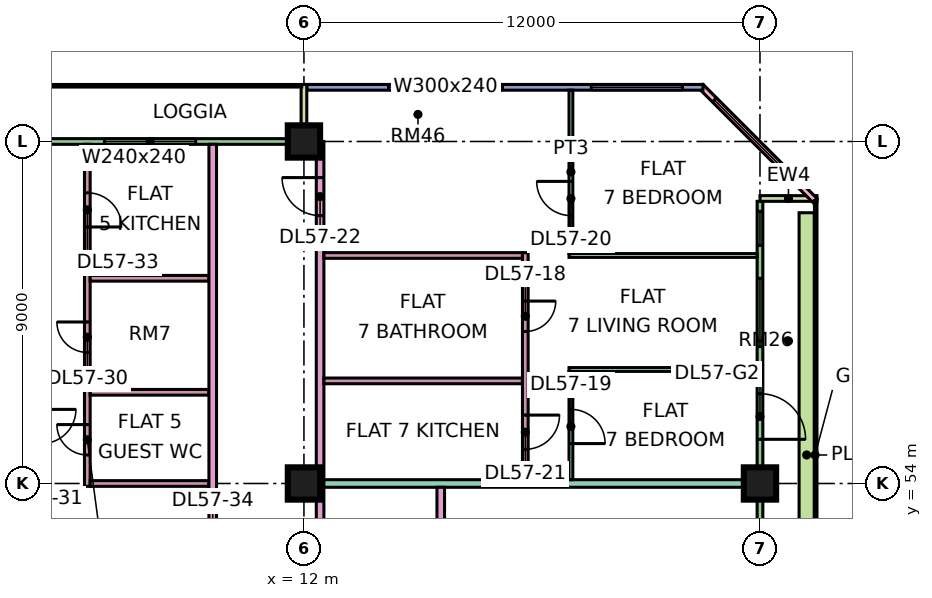
"""IFC4 building model, lengths in metres.
Left out: names, types, materials, properties, quantities, classifications, styles, units other than length and angle.
Written with IfcOpenShell. Run it as: python <this file> out.ifc"""

import sys

from ifc_helpers import new_model, si_unit, direction, frame, frame_2d, origin, origin_2d, place, context, subcontext, project, spatial, rectangle, extrude, element, fill, save


model = new_model("IFC4")
c1 = context("Model", 3, precision=1e-05, world=origin(), true_north=direction((0.0, 1.0)))
c2 = subcontext(c1, "Body", "Model", "MODEL_VIEW")
j1 = project(units=[si_unit("LENGTHUNIT", "METRE"), si_unit("PLANEANGLEUNIT", "RADIAN")], contexts=[c1])
p1 = place(None, origin())
s1 = spatial("IfcSite", under=j1, at=p1, CompositionType="ELEMENT")
p2 = place(p1, origin())
s2 = spatial("IfcBuilding", under=s1, at=p2, CompositionType="ELEMENT")
p3 = place(p2, frame((0.0, 0.0, 241.65)))
s3 = spatial("IfcBuildingStorey", under=s2, at=p3, CompositionType="ELEMENT", Elevation=241.65)
for number, where, z_axis, x_axis in (
    (1, (12.0, 54.0, 0.0), (0.0, 0.0, 1.0), (1.0, 0.0, 0.0)),
    (2, (12.0, 63.0, 0.0), (0.0, 0.0, 1.0), (1.0, 0.0, 0.0)),
    (3, (24.0, 54.0, 0.0), (0.0, 0.0, 1.0), (1.0, 0.0, 0.0)),
):
    element("IfcColumn", number, at=place(p3, frame(where, z_axis=z_axis, x_axis=x_axis)), inside=s3, PredefinedType="COLUMN", context=c2, shape_type="SweptSolid", body=[
        extrude(rectangle(XDim=0.85, YDim=0.85, at=origin_2d()), origin(), (0.0, 0.0, 1.0), 3.75),
    ])
p4 = place(p3, frame((24.0, 48.075, 0.0), z_axis=(0.0, 0.0, 1.0), x_axis=(0.0, 1.0, 0.0)))
e4 = element("IfcWall", 4, at=p4, inside=s3, PredefinedType="SOLIDWALL", context=c2, shape_type="SweptSolid", body=[
    extrude(rectangle(XDim=13.35, YDim=0.15, at=frame_2d((6.675, 0.0))), origin(), (0.0, 0.0, 1.0), 3.35),
])
p5 = place(p4, frame((0.6, 0.0, 0.45)))
e5 = element("IfcOpeningElement", 5, at=p5, cuts=e4, PredefinedType="OPENING", context=c2, shape_type="SweptSolid", body=[
    extrude(rectangle(XDim=4.2, YDim=2.4, at=frame_2d((2.1, 1.2))), frame((0.0, 0.085, 0.0), z_axis=(0.0, -1.0, 0.0), x_axis=(1.0, 0.0, 0.0)), (0.0, 0.0, 1.0), 0.17),
])
p6 = place(p4, frame((7.087, 0.0, 0.0)))
e6 = element("IfcOpeningElement", 6, at=p6, cuts=e4, PredefinedType="OPENING", context=c2, shape_type="SweptSolid", body=[
    extrude(rectangle(XDim=1.2, YDim=2.4, at=frame_2d((0.6, 1.2))), frame((0.0, 0.085, 0.0), z_axis=(0.0, -1.0, 0.0), x_axis=(1.0, 0.0, 0.0)), (0.0, 0.0, 1.0), 0.17),
])
p7 = place(p4, frame((9.525, 0.0, 0.45)))
e7 = element("IfcOpeningElement", 7, at=p7, cuts=e4, PredefinedType="OPENING", context=c2, shape_type="SweptSolid", body=[
    extrude(rectangle(XDim=1.8, YDim=2.4, at=frame_2d((0.9, 1.2))), frame((0.0, 0.085, 0.0), z_axis=(0.0, -1.0, 0.0), x_axis=(1.0, 0.0, 0.0)), (0.0, 0.0, 1.0), 0.17),
])
p8 = place(p4, frame((12.188, 0.0, 0.45)))
e8 = element("IfcOpeningElement", 8, at=p8, cuts=e4, PredefinedType="OPENING", context=c2, shape_type="SweptSolid", body=[
    extrude(rectangle(XDim=0.9, YDim=2.4, at=frame_2d((0.45, 1.2))), frame((0.0, 0.085, 0.0), z_axis=(0.0, -1.0, 0.0), x_axis=(1.0, 0.0, 0.0)), (0.0, 0.0, 1.0), 0.17),
])
p9 = place(p3, frame((25.5, 61.5, 0.0), z_axis=(0.0, 0.0, 1.0), x_axis=(-1.0, 0.0, 0.0)))
e9 = element("IfcWall", 9, at=p9, inside=s3, PredefinedType="SOLIDWALL", context=c2, shape_type="SweptSolid", body=[
    extrude(rectangle(XDim=1.5, YDim=0.15, at=frame_2d((0.75, 0.0))), origin(), (0.0, 0.0, 1.0), 3.35),
])
p10 = place(p3, frame((25.447, 61.447, 0.0), z_axis=(0.0, 0.0, 1.0), x_axis=(-0.707106781187, 0.707106781187, 0.0)))
e10 = element("IfcWall", 10, at=p10, inside=s3, PredefinedType="SOLIDWALL", context=c2, shape_type="SweptSolid", body=[
    extrude(rectangle(XDim=4.243, YDim=0.15, at=frame_2d((2.121, 0.0))), origin(), (0.0, 0.0, 1.0), 3.35),
])
p11 = place(p10, frame((0.744, 0.0, 0.45)))
e11 = element("IfcOpeningElement", 11, at=p11, cuts=e10, PredefinedType="OPENING", context=c2, shape_type="SweptSolid", body=[
    extrude(rectangle(XDim=3.0, YDim=2.4, at=frame_2d((1.5, 1.2))), frame((0.0, 0.085, 0.0), z_axis=(0.0, -1.0, 0.0), x_axis=(1.0, 0.0, 0.0)), (0.0, 0.0, 1.0), 0.17),
])
p12 = place(p3, frame((22.5, 64.425, 0.0), z_axis=(0.0, 0.0, 1.0), x_axis=(-1.0, 0.0, 0.0)))
e12 = element("IfcWall", 12, at=p12, inside=s3, PredefinedType="SOLIDWALL", context=c2, shape_type="SweptSolid", body=[
    extrude(rectangle(XDim=10.425, YDim=0.15, at=frame_2d((5.212, 0.0))), origin(), (0.0, 0.0, 1.0), 3.35),
])
p13 = place(p12, frame((0.538, 0.0, 0.45)))
e13 = element("IfcOpeningElement", 13, at=p13, cuts=e12, PredefinedType="OPENING", context=c2, shape_type="SweptSolid", body=[
    extrude(rectangle(XDim=2.4, YDim=2.4, at=frame_2d((1.2, 1.2))), frame((0.0, 0.085, 0.0), z_axis=(0.0, -1.0, 0.0), x_axis=(1.0, 0.0, 0.0)), (0.0, 0.0, 1.0), 0.17),
])
p14 = place(p12, frame((5.275, 0.0, 0.45)))
e14 = element("IfcOpeningElement", 14, at=p14, cuts=e12, PredefinedType="OPENING", context=c2, shape_type="SweptSolid", body=[
    extrude(rectangle(XDim=3.0, YDim=2.4, at=frame_2d((1.5, 1.2))), frame((0.0, 0.085, 0.0), z_axis=(0.0, -1.0, 0.0), x_axis=(1.0, 0.0, 0.0)), (0.0, 0.0, 1.0), 0.17),
])
p15 = place(p3, frame((11.925, 63.0, 0.0), z_axis=(0.0, 0.0, 1.0), x_axis=(-1.0, 0.0, 0.0)))
e15 = element("IfcWall", 15, at=p15, inside=s3, PredefinedType="SOLIDWALL", context=c2, shape_type="SweptSolid", body=[
    extrude(rectangle(XDim=10.35, YDim=0.15, at=frame_2d((5.175, 0.0))), origin(), (0.0, 0.0, 1.0), 3.35),
])
p16 = place(p15, frame((2.775, 0.0, 0.45)))
e16 = element("IfcOpeningElement", 16, at=p16, cuts=e15, PredefinedType="OPENING", context=c2, shape_type="SweptSolid", body=[
    extrude(rectangle(XDim=2.4, YDim=2.4, at=frame_2d((1.2, 1.2))), frame((0.0, 0.085, 0.0), z_axis=(0.0, -1.0, 0.0), x_axis=(1.0, 0.0, 0.0)), (0.0, 0.0, 1.0), 0.17),
])
p17 = place(p15, frame((7.087, 0.0, 0.0)))
e17 = element("IfcOpeningElement", 17, at=p17, cuts=e15, PredefinedType="OPENING", context=c2, shape_type="SweptSolid", body=[
    extrude(rectangle(XDim=1.8, YDim=2.4, at=frame_2d((0.9, 1.2))), frame((0.0, 0.085, 0.0), z_axis=(0.0, -1.0, 0.0), x_axis=(1.0, 0.0, 0.0)), (0.0, 0.0, 1.0), 0.17),
])
p18 = place(p3, frame((12.0, 64.5, 0.0), z_axis=(0.0, 0.0, 1.0), x_axis=(0.0, -1.0, 0.0)))
e18 = element("IfcWall", 18, at=p18, inside=s3, PredefinedType="SOLIDWALL", context=c2, shape_type="SweptSolid", body=[
    extrude(rectangle(XDim=1.5, YDim=0.15, at=frame_2d((0.75, 0.0))), origin(), (0.0, 0.0, 1.0), 3.35),
])
p19 = place(p3, frame((25.229, 48.375, 0.0), z_axis=(0.0, 0.0, 1.0), x_axis=(0.0, 1.0, 0.0)))
e19 = element("IfcWall", 19, at=p19, inside=s3, PredefinedType="SOLIDWALL", context=c2, shape_type="SweptSolid", body=[
    extrude(rectangle(XDim=12.75, YDim=0.4, at=frame_2d((6.375, 0.0))), origin(), (0.0, 0.0, 1.0), 0.7),
])
p20 = place(p3, frame((6.3, 53.925, 0.0), z_axis=(0.0, 0.0, 1.0), x_axis=(0.0, 1.0, 0.0)))
e20 = element("IfcWall", 20, at=p20, inside=s3, PredefinedType="PARTITIONING", context=c2, shape_type="SweptSolid", body=[
    extrude(rectangle(XDim=9.001, YDim=0.15, at=frame_2d((4.5, 0.0))), origin(), (0.0, 0.0, 1.0), 3.35),
])
p21 = place(p20, frame((3.525, 0.0, 0.0)))
e21 = element("IfcOpeningElement", 21, at=p21, cuts=e20, PredefinedType="OPENING", context=c2, shape_type="SweptSolid", body=[
    extrude(rectangle(XDim=0.8, YDim=2.1, at=frame_2d((0.4, 1.05))), frame((0.0, 0.085, 0.0), z_axis=(0.0, -1.0, 0.0), x_axis=(1.0, 0.0, 0.0)), (0.0, 0.0, 1.0), 0.17),
])
p22 = place(p20, frame((6.825, 0.0, 0.0)))
e22 = element("IfcOpeningElement", 22, at=p22, cuts=e20, PredefinedType="OPENING", context=c2, shape_type="SweptSolid", body=[
    extrude(rectangle(XDim=0.9, YDim=2.1, at=frame_2d((0.45, 1.05))), frame((0.0, 0.085, 0.0), z_axis=(0.0, -1.0, 0.0), x_axis=(1.0, 0.0, 0.0)), (0.0, 0.0, 1.0), 0.17),
])
p23 = place(p20, frame((0.825, 0.0, 0.0)))
e23 = element("IfcOpeningElement", 23, at=p23, cuts=e20, PredefinedType="OPENING", context=c2, shape_type="SweptSolid", body=[
    extrude(rectangle(XDim=0.8, YDim=2.1, at=frame_2d((0.4, 1.05))), frame((0.0, 0.085, 0.0), z_axis=(0.0, -1.0, 0.0), x_axis=(1.0, 0.0, 0.0)), (0.0, 0.0, 1.0), 0.17),
])
for number, where, z_axis, x_axis in (
    (24, (6.375, 54.0, 0.0), (0.0, 0.0, 1.0), (1.0, 0.0, 0.0)),
    (25, (6.375, 56.4, 0.0), (0.0, 0.0, 1.0), (1.0, 0.0, 0.0)),
    (26, (6.375, 59.4, 0.0), (0.0, 0.0, 1.0), (1.0, 0.0, 0.0)),
):
    element("IfcWall", number, at=place(p3, frame(where, z_axis=z_axis, x_axis=x_axis)), inside=s3, PredefinedType="PARTITIONING", context=c2, shape_type="SweptSolid", body=[
        extrude(rectangle(XDim=3.125, YDim=0.15, at=frame_2d((1.562, 0.0))), origin(), (0.0, 0.0, 1.0), 3.35),
    ])
p24 = place(p3, frame((9.6, 20.0, 0.0), z_axis=(0.0, 0.0, 1.0), x_axis=(0.0, 1.0, 0.0)))
e27 = element("IfcWall", 27, at=p24, inside=s3, PredefinedType="PARTITIONING", context=c2, shape_type="SweptSolid", body=[
    extrude(rectangle(XDim=42.926, YDim=0.2, at=frame_2d((21.463, 0.0))), origin(), (0.0, 0.0, 1.0), 3.35),
])
p25 = place(p24, frame((28.95, 0.0, 0.0)))
e28 = element("IfcOpeningElement", 28, at=p25, cuts=e27, PredefinedType="OPENING", context=c2, shape_type="SweptSolid", body=[
    extrude(rectangle(XDim=1.0, YDim=2.1, at=frame_2d((0.5, 1.05))), frame((0.0, 0.11, 0.0), z_axis=(0.0, -1.0, 0.0), x_axis=(1.0, 0.0, 0.0)), (0.0, 0.0, 1.0), 0.22),
])
p26 = place(p24, frame((31.95, 0.0, 0.0)))
e29 = element("IfcOpeningElement", 29, at=p26, cuts=e27, PredefinedType="OPENING", context=c2, shape_type="SweptSolid", body=[
    extrude(rectangle(XDim=1.0, YDim=2.1, at=frame_2d((0.5, 1.05))), frame((0.0, 0.11, 0.0), z_axis=(0.0, -1.0, 0.0), x_axis=(1.0, 0.0, 0.0)), (0.0, 0.0, 1.0), 0.22),
])
p27 = place(p24, frame((0.6, 0.0, 0.0)))
e30 = element("IfcOpeningElement", 30, at=p27, cuts=e27, PredefinedType="OPENING", context=c2, shape_type="SweptSolid", body=[
    extrude(rectangle(XDim=1.2, YDim=2.1, at=frame_2d((0.6, 1.05))), frame((0.0, 0.11, 0.0), z_axis=(0.0, -1.0, 0.0), x_axis=(1.0, 0.0, 0.0)), (0.0, 0.0, 1.0), 0.22),
])
p28 = place(p24, frame((11.25, 0.0, 0.0)))
e31 = element("IfcOpeningElement", 31, at=p28, cuts=e27, PredefinedType="OPENING", context=c2, shape_type="SweptSolid", body=[
    extrude(rectangle(XDim=1.0, YDim=2.1, at=frame_2d((0.5, 1.05))), frame((0.0, 0.11, 0.0), z_axis=(0.0, -1.0, 0.0), x_axis=(1.0, 0.0, 0.0)), (0.0, 0.0, 1.0), 0.22),
])
p29 = place(p3, frame((12.425, 20.0, 0.0), z_axis=(0.0, 0.0, 1.0), x_axis=(0.0, 1.0, 0.0)))
e32 = element("IfcWall", 32, at=p29, inside=s3, PredefinedType="PARTITIONING", context=c2, shape_type="SweptSolid", body=[
    extrude(rectangle(XDim=43.0, YDim=0.2, at=frame_2d((21.5, 0.0))), origin(), (0.0, 0.0, 1.0), 3.35),
])
p30 = place(p29, frame((5.95, 0.0, 0.0)))
e33 = element("IfcOpeningElement", 33, at=p30, cuts=e32, PredefinedType="OPENING", context=c2, shape_type="SweptSolid", body=[
    extrude(rectangle(XDim=1.0, YDim=2.1, at=frame_2d((0.5, 1.05))), frame((0.0, 0.11, 0.0), z_axis=(0.0, -1.0, 0.0), x_axis=(1.0, 0.0, 0.0)), (0.0, 0.0, 1.0), 0.22),
])
p31 = place(p29, frame((12.0, 0.0, 0.0)))
e34 = element("IfcOpeningElement", 34, at=p31, cuts=e32, PredefinedType="OPENING", context=c2, shape_type="SweptSolid", body=[
    extrude(rectangle(XDim=1.0, YDim=2.1, at=frame_2d((0.5, 1.05))), frame((0.0, 0.11, 0.0), z_axis=(0.0, -1.0, 0.0), x_axis=(1.0, 0.0, 0.0)), (0.0, 0.0, 1.0), 0.22),
])
p32 = place(p29, frame((16.9, 0.0, 0.0)))
e35 = element("IfcOpeningElement", 35, at=p32, cuts=e32, PredefinedType="OPENING", context=c2, shape_type="SweptSolid", body=[
    extrude(rectangle(XDim=1.0, YDim=2.1, at=frame_2d((0.5, 1.05))), frame((0.0, 0.11, 0.0), z_axis=(0.0, -1.0, 0.0), x_axis=(1.0, 0.0, 0.0)), (0.0, 0.0, 1.0), 0.22),
])
p33 = place(p29, frame((41.05, 0.0, 0.0)))
e36 = element("IfcOpeningElement", 36, at=p33, cuts=e32, PredefinedType="OPENING", context=c2, shape_type="SweptSolid", body=[
    extrude(rectangle(XDim=1.0, YDim=2.1, at=frame_2d((0.5, 1.05))), frame((0.0, 0.11, 0.0), z_axis=(0.0, -1.0, 0.0), x_axis=(1.0, 0.0, 0.0)), (0.0, 0.0, 1.0), 0.22),
])
p34 = place(p29, frame((1.15, 0.0, 0.0)))
e37 = element("IfcOpeningElement", 37, at=p34, cuts=e32, PredefinedType="OPENING", context=c2, shape_type="SweptSolid", body=[
    extrude(rectangle(XDim=1.8, YDim=2.1, at=frame_2d((0.9, 1.05))), frame((0.0, 0.11, 0.0), z_axis=(0.0, -1.0, 0.0), x_axis=(1.0, 0.0, 0.0)), (0.0, 0.0, 1.0), 0.22),
])
p35 = place(p29, frame((28.6, 0.0, 0.0)))
e38 = element("IfcOpeningElement", 38, at=p35, cuts=e32, PredefinedType="OPENING", context=c2, shape_type="SweptSolid", body=[
    extrude(rectangle(XDim=1.8, YDim=2.1, at=frame_2d((0.9, 1.05))), frame((0.0, 0.11, 0.0), z_axis=(0.0, -1.0, 0.0), x_axis=(1.0, 0.0, 0.0)), (0.0, 0.0, 1.0), 0.22),
])
p36 = place(p3, frame((12.525, 54.0, 0.0), z_axis=(0.0, 0.0, 1.0), x_axis=(1.0, 0.0, 0.0)))
e39 = element("IfcWall", 39, at=p36, inside=s3, PredefinedType="PARTITIONING", context=c2, shape_type="SweptSolid", body=[
    extrude(rectangle(XDim=11.401, YDim=0.2, at=frame_2d((5.701, 0.0))), origin(), (0.0, 0.0, 1.0), 3.35),
])
for number, where, z_axis, x_axis in (
    (40, (12.525, 56.7, 0.0), (0.0, 0.0, 1.0), (1.0, 0.0, 0.0)),
    (41, (12.525, 60.0, 0.0), (0.0, 0.0, 1.0), (1.0, 0.0, 0.0)),
):
    element("IfcWall", number, at=place(p3, frame(where, z_axis=z_axis, x_axis=x_axis)), inside=s3, PredefinedType="PARTITIONING", context=c2, shape_type="SweptSolid", body=[
        extrude(rectangle(XDim=5.225, YDim=0.15, at=frame_2d((2.613, 0.0))), origin(), (0.0, 0.0, 1.0), 3.35),
    ])
p37 = place(p3, frame((15.6, 51.225, 0.0), z_axis=(0.0, 0.0, 1.0), x_axis=(0.0, 1.0, 0.0)))
e42 = element("IfcWall", 42, at=p37, inside=s3, PredefinedType="PARTITIONING", context=c2, shape_type="SweptSolid", body=[
    extrude(rectangle(XDim=2.675, YDim=0.2, at=frame_2d((1.337, 0.0))), origin(), (0.0, 0.0, 1.0), 3.35),
])
p38 = place(p3, frame((17.825, 54.1, 0.0), z_axis=(0.0, 0.0, 1.0), x_axis=(0.0, 1.0, 0.0)))
e43 = element("IfcWall", 43, at=p38, inside=s3, PredefinedType="PARTITIONING", context=c2, shape_type="SweptSolid", body=[
    extrude(rectangle(XDim=5.975, YDim=0.15, at=frame_2d((2.987, 0.0))), origin(), (0.0, 0.0, 1.0), 3.35),
])
p39 = place(p38, frame((3.9, 0.0, 0.0)))
e44 = element("IfcOpeningElement", 44, at=p39, cuts=e43, PredefinedType="OPENING", context=c2, shape_type="SweptSolid", body=[
    extrude(rectangle(XDim=0.8, YDim=2.1, at=frame_2d((0.4, 1.05))), frame((0.0, 0.085, 0.0), z_axis=(0.0, -1.0, 0.0), x_axis=(1.0, 0.0, 0.0)), (0.0, 0.0, 1.0), 0.17),
])
p40 = place(p38, frame((0.8, 0.0, 0.0)))
e45 = element("IfcOpeningElement", 45, at=p40, cuts=e43, PredefinedType="OPENING", context=c2, shape_type="SweptSolid", body=[
    extrude(rectangle(XDim=0.9, YDim=2.1, at=frame_2d((0.45, 1.05))), frame((0.0, 0.085, 0.0), z_axis=(0.0, -1.0, 0.0), x_axis=(1.0, 0.0, 0.0)), (0.0, 0.0, 1.0), 0.17),
])
for number, where, z_axis, x_axis in (
    (46, (18.975, 57.0, 0.0), (0.0, 0.0, 1.0), (1.0, 0.0, 0.0)),
    (47, (18.975, 60.0, 0.0), (0.0, 0.0, 1.0), (1.0, 0.0, 0.0)),
):
    element("IfcWall", number, at=place(p3, frame(where, z_axis=z_axis, x_axis=x_axis)), inside=s3, PredefinedType="PARTITIONING", context=c2, shape_type="SweptSolid", body=[
        extrude(rectangle(XDim=4.951, YDim=0.1, at=frame_2d((2.476, 0.0))), origin(), (0.0, 0.0, 1.0), 3.35),
    ])
p41 = place(p3, frame((19.025, 54.1, 0.0), z_axis=(0.0, 0.0, 1.0), x_axis=(0.0, 1.0, 0.0)))
e48 = element("IfcWall", 48, at=p41, inside=s3, PredefinedType="PARTITIONING", context=c2, shape_type="SweptSolid", body=[
    extrude(rectangle(XDim=2.85, YDim=0.1, at=frame_2d((1.425, 0.0))), origin(), (0.0, 0.0, 1.0), 3.35),
])
p42 = place(p41, frame((0.95, 0.0, 0.0)))
e49 = element("IfcOpeningElement", 49, at=p42, cuts=e48, PredefinedType="OPENING", context=c2, shape_type="SweptSolid", body=[
    extrude(rectangle(XDim=0.9, YDim=2.1, at=frame_2d((0.45, 1.05))), frame((0.0, 0.06, 0.0), z_axis=(0.0, -1.0, 0.0), x_axis=(1.0, 0.0, 0.0)), (0.0, 0.0, 1.0), 0.12),
])
p43 = place(p3, frame((19.025, 60.05, 0.0), z_axis=(0.0, 0.0, 1.0), x_axis=(0.0, 1.0, 0.0)))
e50 = element("IfcWall", 50, at=p43, inside=s3, PredefinedType="PARTITIONING", context=c2, shape_type="SweptSolid", body=[
    extrude(rectangle(XDim=4.301, YDim=0.1, at=frame_2d((2.15, 0.0))), origin(), (0.0, 0.0, 1.0), 3.35),
])
p44 = place(p43, frame((1.0, 0.0, 0.0)))
e51 = element("IfcOpeningElement", 51, at=p44, cuts=e50, PredefinedType="OPENING", context=c2, shape_type="SweptSolid", body=[
    extrude(rectangle(XDim=0.9, YDim=2.1, at=frame_2d((0.45, 1.05))), frame((0.0, 0.06, 0.0), z_axis=(0.0, -1.0, 0.0), x_axis=(1.0, 0.0, 0.0)), (0.0, 0.0, 1.0), 0.12),
])
p45 = place(p6, frame((1.2, 0.0, 0.0), z_axis=(0.0, 0.0, 1.0), x_axis=(-1.0, 0.0, 0.0)))
e52 = element("IfcDoor", 52, at=p45, inside=s3, OperationType="DOUBLE_DOOR_SINGLE_SWING", PredefinedType="DOOR", context=c2, shape_type="SweptSolid", body=[
    extrude(rectangle(XDim=1.2, YDim=2.4, at=frame_2d((0.6, 1.2))), frame((0.0, 0.025, 0.0), z_axis=(0.0, -1.0, 0.0), x_axis=(1.0, 0.0, 0.0)), (0.0, 0.0, 1.0), 0.05),
])
fill(e6, e52)
p46 = place(p7, origin())
e53 = element("IfcWindow", 53, at=p46, inside=s3, PartitioningType="SINGLE_PANEL", PredefinedType="WINDOW", context=c2, shape_type="SweptSolid", body=[
    extrude(rectangle(XDim=1.8, YDim=2.4, at=frame_2d((0.9, 1.2))), frame((0.0, 0.03, 0.0), z_axis=(0.0, -1.0, 0.0), x_axis=(1.0, 0.0, 0.0)), (0.0, 0.0, 1.0), 0.06),
])
fill(e7, e53)
p47 = place(p8, origin())
e54 = element("IfcWindow", 54, at=p47, inside=s3, PartitioningType="SINGLE_PANEL", PredefinedType="WINDOW", context=c2, shape_type="SweptSolid", body=[
    extrude(rectangle(XDim=0.9, YDim=2.4, at=frame_2d((0.45, 1.2))), frame((0.0, 0.03, 0.0), z_axis=(0.0, -1.0, 0.0), x_axis=(1.0, 0.0, 0.0)), (0.0, 0.0, 1.0), 0.06),
])
fill(e8, e54)
p48 = place(p11, origin())
e55 = element("IfcWindow", 55, at=p48, inside=s3, PartitioningType="SINGLE_PANEL", PredefinedType="WINDOW", context=c2, shape_type="SweptSolid", body=[
    extrude(rectangle(XDim=3.0, YDim=2.4, at=frame_2d((1.5, 1.2))), frame((0.0, 0.03, 0.0), z_axis=(0.0, -1.0, 0.0), x_axis=(1.0, 0.0, 0.0)), (0.0, 0.0, 1.0), 0.06),
])
fill(e11, e55)
p49 = place(p13, origin())
e56 = element("IfcWindow", 56, at=p49, inside=s3, PartitioningType="SINGLE_PANEL", PredefinedType="WINDOW", context=c2, shape_type="SweptSolid", body=[
    extrude(rectangle(XDim=2.4, YDim=2.4, at=frame_2d((1.2, 1.2))), frame((0.0, 0.03, 0.0), z_axis=(0.0, -1.0, 0.0), x_axis=(1.0, 0.0, 0.0)), (0.0, 0.0, 1.0), 0.06),
])
fill(e13, e56)
p50 = place(p14, origin())
e57 = element("IfcWindow", 57, at=p50, inside=s3, PartitioningType="SINGLE_PANEL", PredefinedType="WINDOW", context=c2, shape_type="SweptSolid", body=[
    extrude(rectangle(XDim=3.0, YDim=2.4, at=frame_2d((1.5, 1.2))), frame((0.0, 0.03, 0.0), z_axis=(0.0, -1.0, 0.0), x_axis=(1.0, 0.0, 0.0)), (0.0, 0.0, 1.0), 0.06),
])
fill(e14, e57)
p51 = place(p16, origin())
e58 = element("IfcWindow", 58, at=p51, inside=s3, PartitioningType="SINGLE_PANEL", PredefinedType="WINDOW", context=c2, shape_type="SweptSolid", body=[
    extrude(rectangle(XDim=2.4, YDim=2.4, at=frame_2d((1.2, 1.2))), frame((0.0, 0.03, 0.0), z_axis=(0.0, -1.0, 0.0), x_axis=(1.0, 0.0, 0.0)), (0.0, 0.0, 1.0), 0.06),
])
fill(e16, e58)
p52 = place(p39, origin())
e59 = element("IfcDoor", 59, at=p52, inside=s3, OperationType="SINGLE_SWING_RIGHT", PredefinedType="DOOR", context=c2, shape_type="SweptSolid", body=[
    extrude(rectangle(XDim=0.8, YDim=2.1, at=frame_2d((0.4, 1.05))), frame((0.0, 0.025, 0.0), z_axis=(0.0, -1.0, 0.0), x_axis=(1.0, 0.0, 0.0)), (0.0, 0.0, 1.0), 0.05),
])
fill(e44, e59)
p53 = place(p42, frame((0.9, 0.0, 0.0), z_axis=(0.0, 0.0, 1.0), x_axis=(-1.0, 0.0, 0.0)))
e60 = element("IfcDoor", 60, at=p53, inside=s3, OperationType="SINGLE_SWING_LEFT", PredefinedType="DOOR", context=c2, shape_type="SweptSolid", body=[
    extrude(rectangle(XDim=0.9, YDim=2.1, at=frame_2d((0.45, 1.05))), frame((0.0, 0.025, 0.0), z_axis=(0.0, -1.0, 0.0), x_axis=(1.0, 0.0, 0.0)), (0.0, 0.0, 1.0), 0.05),
])
fill(e49, e60)
p54 = place(p44, frame((0.9, 0.0, 0.0), z_axis=(0.0, 0.0, 1.0), x_axis=(-1.0, 0.0, 0.0)))
e61 = element("IfcDoor", 61, at=p54, inside=s3, OperationType="SINGLE_SWING_RIGHT", PredefinedType="DOOR", context=c2, shape_type="SweptSolid", body=[
    extrude(rectangle(XDim=0.9, YDim=2.1, at=frame_2d((0.45, 1.05))), frame((0.0, 0.025, 0.0), z_axis=(0.0, -1.0, 0.0), x_axis=(1.0, 0.0, 0.0)), (0.0, 0.0, 1.0), 0.05),
])
fill(e51, e61)
p55 = place(p40, origin())
e62 = element("IfcDoor", 62, at=p55, inside=s3, OperationType="SINGLE_SWING_RIGHT", PredefinedType="DOOR", context=c2, shape_type="SweptSolid", body=[
    extrude(rectangle(XDim=0.9, YDim=2.1, at=frame_2d((0.45, 1.05))), frame((0.0, 0.025, 0.0), z_axis=(0.0, -1.0, 0.0), x_axis=(1.0, 0.0, 0.0)), (0.0, 0.0, 1.0), 0.05),
])
fill(e45, e62)
p56 = place(p33, frame((1.0, 0.0, 0.0), z_axis=(0.0, 0.0, 1.0), x_axis=(-1.0, 0.0, 0.0)))
e63 = element("IfcDoor", 63, at=p56, inside=s3, OperationType="SINGLE_SWING_RIGHT", PredefinedType="DOOR", context=c2, shape_type="SweptSolid", body=[
    extrude(rectangle(XDim=1.0, YDim=2.1, at=frame_2d((0.5, 1.05))), frame((0.0, 0.025, 0.0), z_axis=(0.0, -1.0, 0.0), x_axis=(1.0, 0.0, 0.0)), (0.0, 0.0, 1.0), 0.05),
])
fill(e36, e63)
p57 = place(p21, frame((0.8, 0.0, 0.0), z_axis=(0.0, 0.0, 1.0), x_axis=(-1.0, 0.0, 0.0)))
e64 = element("IfcDoor", 64, at=p57, inside=s3, OperationType="SINGLE_SWING_RIGHT", PredefinedType="DOOR", context=c2, shape_type="SweptSolid", body=[
    extrude(rectangle(XDim=0.8, YDim=2.1, at=frame_2d((0.4, 1.05))), frame((0.0, 0.025, 0.0), z_axis=(0.0, -1.0, 0.0), x_axis=(1.0, 0.0, 0.0)), (0.0, 0.0, 1.0), 0.05),
])
fill(e21, e64)
p58 = place(p22, frame((0.9, 0.0, 0.0), z_axis=(0.0, 0.0, 1.0), x_axis=(-1.0, 0.0, 0.0)))
e65 = element("IfcDoor", 65, at=p58, inside=s3, OperationType="SINGLE_SWING_LEFT", PredefinedType="DOOR", context=c2, shape_type="SweptSolid", body=[
    extrude(rectangle(XDim=0.9, YDim=2.1, at=frame_2d((0.45, 1.05))), frame((0.0, 0.025, 0.0), z_axis=(0.0, -1.0, 0.0), x_axis=(1.0, 0.0, 0.0)), (0.0, 0.0, 1.0), 0.05),
])
fill(e22, e65)
p59 = place(p23, frame((0.8, 0.0, 0.0), z_axis=(0.0, 0.0, 1.0), x_axis=(-1.0, 0.0, 0.0)))
e66 = element("IfcDoor", 66, at=p59, inside=s3, OperationType="SINGLE_SWING_RIGHT", PredefinedType="DOOR", context=c2, shape_type="SweptSolid", body=[
    extrude(rectangle(XDim=0.8, YDim=2.1, at=frame_2d((0.4, 1.05))), frame((0.0, 0.025, 0.0), z_axis=(0.0, -1.0, 0.0), x_axis=(1.0, 0.0, 0.0)), (0.0, 0.0, 1.0), 0.05),
])
fill(e23, e66)
save(model, sys.argv[1])
